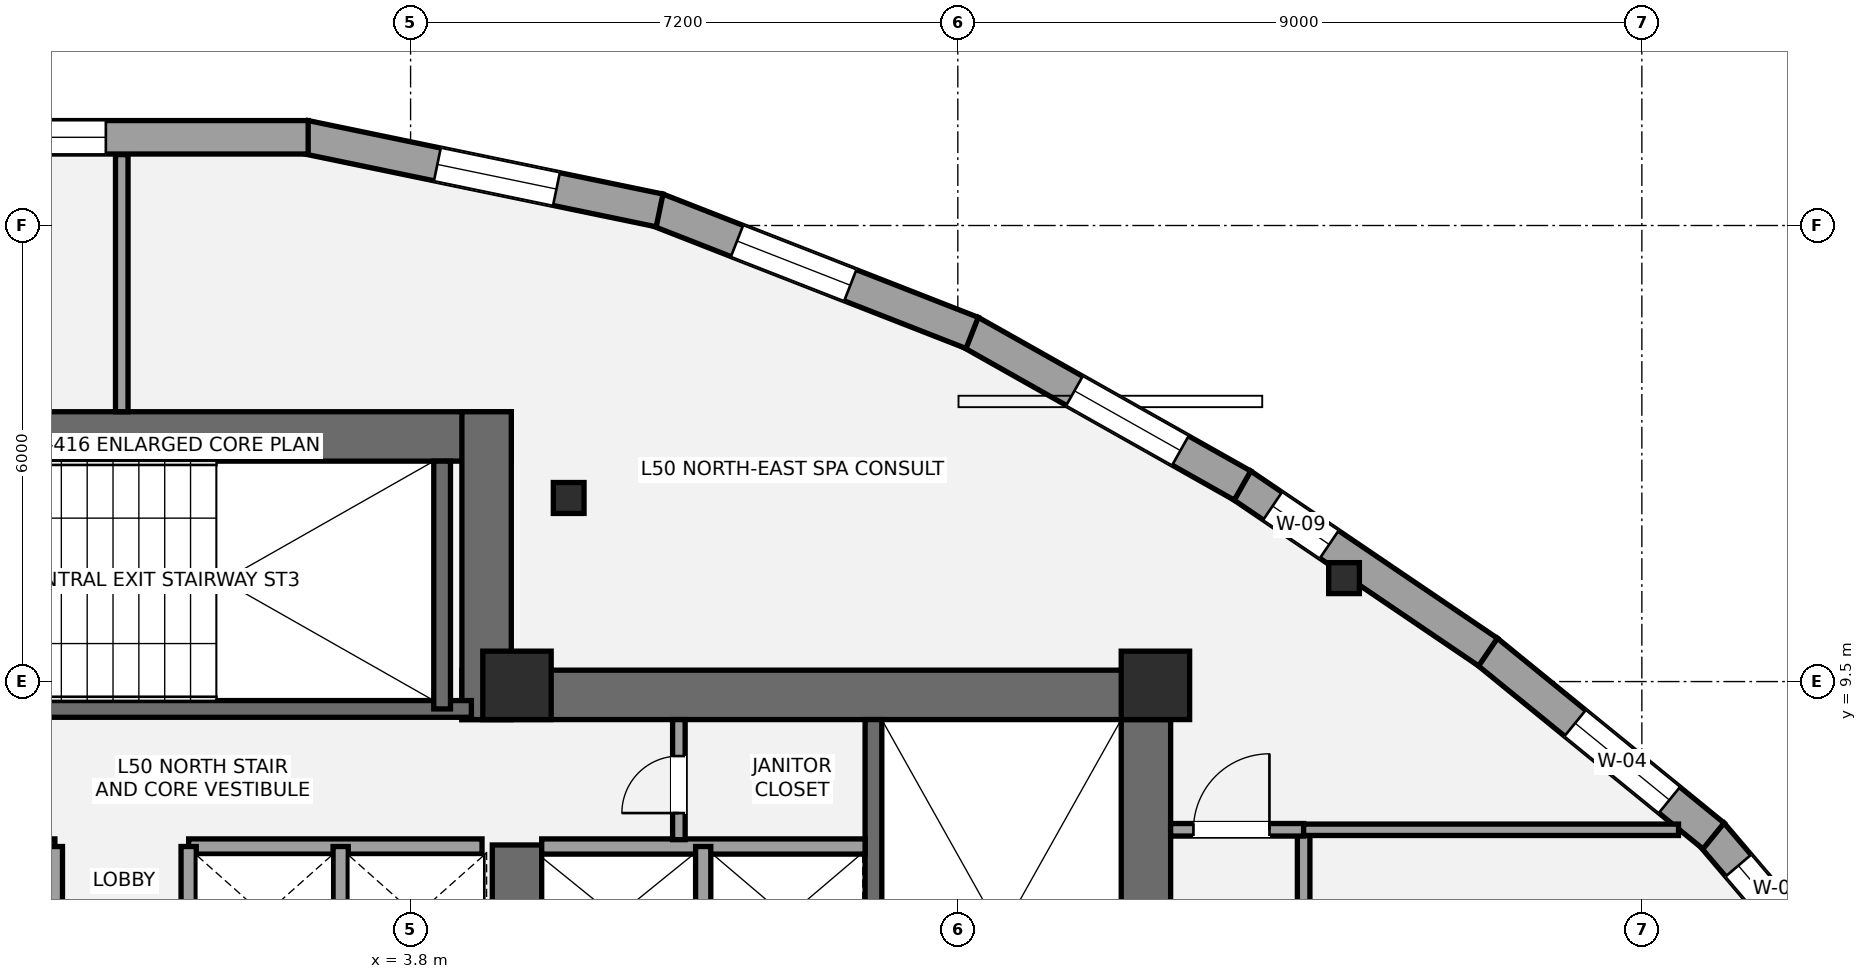
"""IFC4 building model, lengths in metres.
Left out: names, types, materials, properties, quantities, classifications, styles, units other than length and angle.
Written with IfcOpenShell. Run it as: python <this file> out.ifc"""

import sys

from ifc_helpers import new_model, si_unit, direction, frame, frame_2d, origin, origin_2d, place, context, subcontext, project, spatial, rectangle, i_section, extrude, element, fill, save


model = new_model("IFC4")
c1 = context("Model", 3, precision=1e-05, world=origin(), true_north=direction((0.0, 1.0)))
c2 = subcontext(c1, "Body", "Model", "MODEL_VIEW")
j1 = project(units=[si_unit("LENGTHUNIT", "METRE"), si_unit("PLANEANGLEUNIT", "RADIAN")], contexts=[c1])
p1 = place(None, origin())
s1 = spatial("IfcSite", under=j1, at=p1, CompositionType="ELEMENT")
p2 = place(p1, origin())
s2 = spatial("IfcBuilding", under=s1, at=p2, CompositionType="ELEMENT")
p3 = place(p2, frame((0.0, 0.0, 182.2)))
s3 = spatial("IfcBuildingStorey", under=s2, at=p3, CompositionType="ELEMENT", Elevation=182.2)
p4 = place(p3, frame((13.475, 1.2, 0.0), z_axis=(0.0, 0.0, 1.0), x_axis=(0.0, 1.0, 0.0)))
e1 = element("IfcWall", 1, at=p4, inside=s3, PredefinedType="SHEAR", context=c2, shape_type="SweptSolid", body=[
    extrude(rectangle(XDim=8.45, YDim=0.65, at=frame_2d((4.225, 0.0))), origin(), (0.0, 0.0, 1.0), 3.2),
])
p5 = place(p3, frame((4.475, 9.325, 0.0), z_axis=(0.0, 0.0, 1.0), x_axis=(1.0, 0.0, 0.0)))
e2 = element("IfcWall", 2, at=p5, inside=s3, PredefinedType="SHEAR", context=c2, shape_type="SweptSolid", body=[
    extrude(rectangle(XDim=9.325, YDim=0.65, at=frame_2d((4.663, 0.0))), origin(), (0.0, 0.0, 1.0), 3.2),
])
p6 = place(p3, frame((5.2, 5.35, 0.0), z_axis=(0.0, 0.0, 1.0), x_axis=(0.0, 1.0, 0.0)))
e3 = element("IfcWall", 3, at=p6, inside=s3, PredefinedType="SHEAR", context=c2, shape_type="SweptSolid", body=[
    extrude(rectangle(XDim=2.0, YDim=0.65, at=frame_2d((1.0, 0.0))), origin(), (0.0, 0.0, 1.0), 3.2),
])
p7 = place(p3, frame((9.89, 1.85, 0.0), z_axis=(0.0, 0.0, 1.0), x_axis=(0.0, 1.0, 0.0)))
e4 = element("IfcWall", 4, at=p7, inside=s3, PredefinedType="SHEAR", context=c2, shape_type="SweptSolid", body=[
    extrude(rectangle(XDim=7.15, YDim=0.22, at=frame_2d((3.575, 0.0))), origin(), (0.0, 0.0, 1.0), 3.2),
])
p8 = place(p3, frame((-5.125, 12.725, 0.0), z_axis=(0.0, 0.0, 1.0), x_axis=(1.0, 0.0, 0.0)))
e5 = element("IfcWall", 5, at=p8, inside=s3, PredefinedType="SHEAR", context=c2, shape_type="SweptSolid", body=[
    extrude(rectangle(XDim=10.25, YDim=0.65, at=frame_2d((5.125, 0.0))), origin(), (0.0, 0.0, 1.0), 3.2),
])
p9 = place(p3, frame((4.8, 9.0, 0.0), z_axis=(0.0, 0.0, 1.0), x_axis=(0.0, 1.0, 0.0)))
e6 = element("IfcWall", 6, at=p9, inside=s3, PredefinedType="SHEAR", context=c2, shape_type="SweptSolid", body=[
    extrude(rectangle(XDim=4.05, YDim=0.65, at=frame_2d((2.025, 0.0))), origin(), (0.0, 0.0, 1.0), 3.2),
])
p10 = place(p3, frame((-4.7, 9.14, 0.0), z_axis=(0.0, 0.0, 1.0), x_axis=(1.0, 0.0, 0.0)))
e7 = element("IfcWall", 7, at=p10, inside=s3, PredefinedType="SHEAR", context=c2, shape_type="SweptSolid", body=[
    extrude(rectangle(XDim=9.3, YDim=0.22, at=frame_2d((4.65, 0.0))), origin(), (0.0, 0.0, 1.0), 3.2),
])
p11 = place(p10, frame((1.15, 0.0, 0.0)))
e8 = element("IfcOpeningElement", 8, at=p11, cuts=e7, PredefinedType="OPENING", context=c2, shape_type="SweptSolid", body=[
    extrude(rectangle(XDim=1.05, YDim=2.15, at=frame_2d((0.525, 1.075))), frame((0.0, 0.12, 0.0), z_axis=(0.0, -1.0, 0.0), x_axis=(1.0, 0.0, 0.0)), (0.0, 0.0, 1.0), 0.24),
])
p12 = place(p3, frame((4.215, 9.14, 0.0), z_axis=(0.0, 0.0, 1.0), x_axis=(0.0, 1.0, 0.0)))
e9 = element("IfcWall", 9, at=p12, inside=s3, PredefinedType="SHEAR", context=c2, shape_type="SweptSolid", body=[
    extrude(rectangle(XDim=3.26, YDim=0.22, at=frame_2d((1.63, 0.0))), origin(), (0.0, 0.0, 1.0), 3.2),
])
for number, where, z_axis, x_axis in (
    (10, (5.2, 9.45, 0.0), (0.0, 0.0, 1.0), (1.0, 0.0, 0.0)),
    (11, (13.6, 9.45, 0.0), (0.0, 0.0, 1.0), (1.0, 0.0, 0.0)),
):
    element("IfcColumn", number, at=place(p3, frame(where, z_axis=z_axis, x_axis=x_axis)), inside=s3, PredefinedType="COLUMN", context=c2, shape_type="SweptSolid", body=[
        extrude(rectangle(XDim=0.9, YDim=0.9, at=origin_2d()), origin(), (0.0, 0.0, 1.0), 3.2),
    ])
for number, where, z_axis, x_axis in (
    (12, (16.082, 10.861, 0.0), (0.0, 0.0, 1.0), (1.0, 0.0, 0.0)),
    (13, (5.88, 11.915, 0.0), (0.0, 0.0, 1.0), (1.0, 0.0, 0.0)),
):
    element("IfcColumn", number, at=place(p3, frame(where, z_axis=z_axis, x_axis=x_axis)), inside=s3, PredefinedType="COLUMN", context=c2, shape_type="SweptSolid", body=[
        extrude(i_section(OverallWidth=0.404, OverallDepth=0.407, WebThickness=0.027, FlangeThickness=0.044, at=origin_2d()), origin(), (0.0, 0.0, 1.0), 3.2),
    ])
p13 = place(p3, frame((20.914, 7.497, 0.0), z_axis=(0.0, 0.0, 1.0), x_axis=(0.648014991522, -0.761627580096, 0.0)))
e14 = element("IfcWall", 14, at=p13, inside=s3, PredefinedType="STANDARD", context=c2, shape_type="SweptSolid", body=[
    extrude(rectangle(XDim=3.692, YDim=0.44, at=frame_2d((1.846, 0.0))), origin(), (0.0, 0.0, 1.0), 2.315),
])
p14 = place(p13, frame((0.548, 0.0, 0.58)))
e15 = element("IfcOpeningElement", 15, at=p14, cuts=e14, PredefinedType="OPENING", context=c2, shape_type="SweptSolid", body=[
    extrude(rectangle(XDim=1.6, YDim=1.55, at=frame_2d((0.8, 0.775))), frame((0.0, 0.23, 0.0), z_axis=(0.0, -1.0, 0.0), x_axis=(1.0, 0.0, 0.0)), (0.0, 0.0, 1.0), 0.46),
])
p15 = place(p3, frame((17.96, 9.899, 0.0), z_axis=(0.0, 0.0, 1.0), x_axis=(0.77522232587, -0.631688487684, 0.0)))
e16 = element("IfcWall", 16, at=p15, inside=s3, PredefinedType="STANDARD", context=c2, shape_type="SweptSolid", body=[
    extrude(rectangle(XDim=3.847, YDim=0.44, at=frame_2d((1.924, 0.0))), origin(), (0.0, 0.0, 1.0), 2.315),
])
p16 = place(p15, frame((1.498, 0.0, 0.58)))
e17 = element("IfcOpeningElement", 17, at=p16, cuts=e16, PredefinedType="OPENING", context=c2, shape_type="SweptSolid", body=[
    extrude(rectangle(XDim=1.6, YDim=1.55, at=frame_2d((0.8, 0.775))), frame((0.0, 0.23, 0.0), z_axis=(0.0, -1.0, 0.0), x_axis=(1.0, 0.0, 0.0)), (0.0, 0.0, 1.0), 0.46),
])
p17 = place(p3, frame((14.73, 12.088, 0.0), z_axis=(0.0, 0.0, 1.0), x_axis=(0.827733986143, -0.561120707321, 0.0)))
e18 = element("IfcWall", 18, at=p17, inside=s3, PredefinedType="STANDARD", context=c2, shape_type="SweptSolid", body=[
    extrude(rectangle(XDim=3.921, YDim=0.44, at=frame_2d((1.96, 0.0))), origin(), (0.0, 0.0, 1.0), 2.315),
])
p18 = place(p17, frame((0.497, 0.0, 0.58)))
e19 = element("IfcOpeningElement", 19, at=p18, cuts=e18, PredefinedType="OPENING", context=c2, shape_type="SweptSolid", body=[
    extrude(rectangle(XDim=0.9, YDim=1.35, at=frame_2d((0.45, 0.675))), frame((0.0, 0.23, 0.0), z_axis=(0.0, -1.0, 0.0), x_axis=(1.0, 0.0, 0.0)), (0.0, 0.0, 1.0), 0.46),
])
p19 = place(p3, frame((11.16, 14.1, 0.0), z_axis=(0.0, 0.0, 1.0), x_axis=(0.871039635509, -0.491212737388, 0.0)))
e20 = element("IfcWall", 20, at=p19, inside=s3, PredefinedType="STANDARD", context=c2, shape_type="SweptSolid", body=[
    extrude(rectangle(XDim=4.116, YDim=0.44, at=frame_2d((2.058, 0.0))), origin(), (0.0, 0.0, 1.0), 2.315),
])
p20 = place(p19, frame((1.578, 0.0, 0.58)))
e21 = element("IfcOpeningElement", 21, at=p20, cuts=e20, PredefinedType="OPENING", context=c2, shape_type="SweptSolid", body=[
    extrude(rectangle(XDim=1.6, YDim=1.55, at=frame_2d((0.8, 0.775))), frame((0.0, 0.23, 0.0), z_axis=(0.0, -1.0, 0.0), x_axis=(1.0, 0.0, 0.0)), (0.0, 0.0, 1.0), 0.46),
])
p21 = place(p3, frame((7.041, 15.709, 0.0), z_axis=(0.0, 0.0, 1.0), x_axis=(0.93133333838, -0.364167836062, 0.0)))
e22 = element("IfcWall", 22, at=p21, inside=s3, PredefinedType="STANDARD", context=c2, shape_type="SweptSolid", body=[
    extrude(rectangle(XDim=4.454, YDim=0.44, at=frame_2d((2.227, 0.0))), origin(), (0.0, 0.0, 1.0), 2.315),
])
p22 = place(p21, frame((1.132, 0.0, 0.58)))
e23 = element("IfcOpeningElement", 23, at=p22, cuts=e22, PredefinedType="OPENING", context=c2, shape_type="SweptSolid", body=[
    extrude(rectangle(XDim=1.6, YDim=1.55, at=frame_2d((0.8, 0.775))), frame((0.0, 0.23, 0.0), z_axis=(0.0, -1.0, 0.0), x_axis=(1.0, 0.0, 0.0)), (0.0, 0.0, 1.0), 0.46),
])
p23 = place(p3, frame((2.408, 16.665, 0.0), z_axis=(0.0, 0.0, 1.0), x_axis=(0.979222564836, -0.202788482206, 0.0)))
e24 = element("IfcWall", 24, at=p23, inside=s3, PredefinedType="STANDARD", context=c2, shape_type="SweptSolid", body=[
    extrude(rectangle(XDim=4.768, YDim=0.44, at=frame_2d((2.384, 0.0))), origin(), (0.0, 0.0, 1.0), 2.315),
])
p24 = place(p23, frame((1.781, 0.0, 0.58)))
e25 = element("IfcOpeningElement", 25, at=p24, cuts=e24, PredefinedType="OPENING", context=c2, shape_type="SweptSolid", body=[
    extrude(rectangle(XDim=1.6, YDim=1.55, at=frame_2d((0.8, 0.775))), frame((0.0, 0.23, 0.0), z_axis=(0.0, -1.0, 0.0), x_axis=(1.0, 0.0, 0.0)), (0.0, 0.0, 1.0), 0.46),
])
p25 = place(p3, frame((-2.452, 16.66, 0.0), z_axis=(0.0, 0.0, 1.0), x_axis=(1.0, 0.0, 0.0)))
e26 = element("IfcWall", 26, at=p25, inside=s3, PredefinedType="STANDARD", context=c2, shape_type="SweptSolid", body=[
    extrude(rectangle(XDim=4.905, YDim=0.44, at=frame_2d((2.452, 0.0))), origin(), (0.0, 0.0, 1.0), 2.315),
])
p26 = place(p25, frame((0.643, 0.0, 0.58)))
e27 = element("IfcOpeningElement", 27, at=p26, cuts=e26, PredefinedType="OPENING", context=c2, shape_type="SweptSolid", body=[
    extrude(rectangle(XDim=1.6, YDim=1.55, at=frame_2d((0.8, 0.775))), frame((0.0, 0.23, 0.0), z_axis=(0.0, -1.0, 0.0), x_axis=(1.0, 0.0, 0.0)), (0.0, 0.0, 1.0), 0.46),
])
p27 = place(p3, frame((5.525, 7.33, 0.0), z_axis=(0.0, 0.0, 1.0), x_axis=(1.0, 0.0, 0.0)))
e28 = element("IfcWall", 28, at=p27, inside=s3, PredefinedType="SOLIDWALL", context=c2, shape_type="SweptSolid", body=[
    extrude(rectangle(XDim=4.255, YDim=0.2, at=frame_2d((2.127, 0.0))), origin(), (0.0, 0.0, 1.0), 3.02),
])
p28 = place(p3, frame((7.65, 5.47, 0.0), z_axis=(0.0, 0.0, 1.0), x_axis=(0.0, 1.0, 0.0)))
e29 = element("IfcWall", 29, at=p28, inside=s3, PredefinedType="SOLIDWALL", context=c2, shape_type="SweptSolid", body=[
    extrude(rectangle(XDim=1.86, YDim=0.2, at=frame_2d((0.93, 0.0))), origin(), (0.0, 0.0, 1.0), 3.02),
])
for number, where, z_axis, x_axis in (
    (30, (-4.74, 7.33, 0.0), (0.0, 0.0, 1.0), (1.0, 0.0, 0.0)),
    (31, (0.88, 7.33, 0.0), (0.0, 0.0, 1.0), (1.0, 0.0, 0.0)),
):
    element("IfcWall", number, at=place(p3, frame(where, z_axis=z_axis, x_axis=x_axis)), inside=s3, PredefinedType="SOLIDWALL", context=c2, shape_type="SweptSolid", body=[
        extrude(rectangle(XDim=3.86, YDim=0.2, at=frame_2d((1.93, 0.0))), origin(), (0.0, 0.0, 1.0), 3.02),
    ])
for number, where, z_axis, x_axis in (
    (32, (2.88, 5.52, 0.0), (0.0, 0.0, 1.0), (0.0, 1.0, 0.0)),
    (33, (-0.88, 5.52, 0.0), (0.0, 0.0, 1.0), (0.0, 1.0, 0.0)),
    (34, (0.88, 5.52, 0.0), (0.0, 0.0, 1.0), (0.0, 1.0, 0.0)),
):
    element("IfcWall", number, at=place(p3, frame(where, z_axis=z_axis, x_axis=x_axis)), inside=s3, PredefinedType="SOLIDWALL", context=c2, shape_type="SweptSolid", body=[
        extrude(rectangle(XDim=1.81, YDim=0.2, at=frame_2d((0.905, 0.0))), origin(), (0.0, 0.0, 1.0), 3.02),
    ])
p29 = place(p3, frame((7.33, 7.42, 0.0), z_axis=(0.0, 0.0, 1.0), x_axis=(0.0, 1.0, 0.0)))
e35 = element("IfcWall", 35, at=p29, inside=s3, PredefinedType="PARTITIONING", context=c2, shape_type="SweptSolid", body=[
    extrude(rectangle(XDim=1.58, YDim=0.165, at=frame_2d((0.79, 0.0))), origin(), (0.0, 0.0, 1.0), 3.02),
])
p30 = place(p29, frame((0.35, 0.0, 0.0)))
e36 = element("IfcOpeningElement", 36, at=p30, cuts=e35, PredefinedType="OPENING", context=c2, shape_type="SweptSolid", body=[
    extrude(rectangle(XDim=0.75, YDim=2.1, at=frame_2d((0.375, 1.05))), frame((0.0, 0.093, 0.0), z_axis=(0.0, -1.0, 0.0), x_axis=(1.0, 0.0, 0.0)), (0.0, 0.0, 1.0), 0.185),
])
p31 = place(p3, frame((15.55, -11.257, 0.0), z_axis=(0.0, 0.0, 1.0), x_axis=(0.0, 1.0, 0.0)))
e37 = element("IfcWall", 37, at=p31, inside=s3, PredefinedType="PARTITIONING", context=c2, shape_type="SweptSolid", body=[
    extrude(rectangle(XDim=18.807, YDim=0.165, at=frame_2d((9.403, 0.0))), origin(), (0.0, 0.0, 1.0), 2.473),
])
p32 = place(p31, frame((4.106, 0.0, 0.0)))
e38 = element("IfcOpeningElement", 38, at=p32, cuts=e37, PredefinedType="OPENING", context=c2, shape_type="SweptSolid", body=[
    extrude(rectangle(XDim=0.85, YDim=2.1, at=frame_2d((0.425, 1.05))), frame((0.0, 0.093, 0.0), z_axis=(0.0, -1.0, 0.0), x_axis=(1.0, 0.0, 0.0)), (0.0, 0.0, 1.0), 0.185),
])
p33 = place(p31, frame((7.257, 0.0, 0.0)))
e39 = element("IfcOpeningElement", 39, at=p33, cuts=e37, PredefinedType="OPENING", context=c2, shape_type="SweptSolid", body=[
    extrude(rectangle(XDim=1.0, YDim=2.15, at=frame_2d((0.5, 1.075))), frame((0.0, 0.093, 0.0), z_axis=(0.0, -1.0, 0.0), x_axis=(1.0, 0.0, 0.0)), (0.0, 0.0, 1.0), 0.185),
])
p34 = place(p31, frame((11.656, 0.0, 0.0)))
e40 = element("IfcOpeningElement", 40, at=p34, cuts=e37, PredefinedType="OPENING", context=c2, shape_type="SweptSolid", body=[
    extrude(rectangle(XDim=1.0, YDim=2.15, at=frame_2d((0.5, 1.075))), frame((0.0, 0.093, 0.0), z_axis=(0.0, -1.0, 0.0), x_axis=(1.0, 0.0, 0.0)), (0.0, 0.0, 1.0), 0.185),
])
p35 = place(p31, frame((16.031, 0.0, 0.0)))
e41 = element("IfcOpeningElement", 41, at=p35, cuts=e37, PredefinedType="OPENING", context=c2, shape_type="SweptSolid", body=[
    extrude(rectangle(XDim=1.0, YDim=2.15, at=frame_2d((0.5, 1.075))), frame((0.0, 0.093, 0.0), z_axis=(0.0, -1.0, 0.0), x_axis=(1.0, 0.0, 0.0)), (0.0, 0.0, 1.0), 0.185),
])
p36 = place(p3, frame((13.8, 7.55, 0.0), z_axis=(0.0, 0.0, 1.0), x_axis=(1.0, 0.0, 0.0)))
e42 = element("IfcWall", 42, at=p36, inside=s3, PredefinedType="PARTITIONING", context=c2, shape_type="SweptSolid", body=[
    extrude(rectangle(XDim=1.75, YDim=0.165, at=frame_2d((0.875, 0.0))), origin(), (0.0, 0.0, 1.0), 3.02),
])
p37 = place(p36, frame((0.3, 0.0, 0.0)))
e43 = element("IfcOpeningElement", 43, at=p37, cuts=e42, PredefinedType="OPENING", context=c2, shape_type="SweptSolid", body=[
    extrude(rectangle(XDim=1.0, YDim=2.15, at=frame_2d((0.5, 1.075))), frame((0.0, 0.093, 0.0), z_axis=(0.0, -1.0, 0.0), x_axis=(1.0, 0.0, 0.0)), (0.0, 0.0, 1.0), 0.185),
])
p38 = place(p3, frame((15.55, 7.55, 0.0), z_axis=(0.0, 0.0, 1.0), x_axis=(1.0, 0.0, 0.0)))
e44 = element("IfcWall", 44, at=p38, inside=s3, PredefinedType="PLUMBINGWALL", context=c2, shape_type="SweptSolid", body=[
    extrude(rectangle(XDim=4.932, YDim=0.15, at=frame_2d((2.466, 0.0))), origin(), (0.0, 0.0, 1.0), 2.473),
])
p39 = place(p3, frame((0.0, 13.05, 0.0), z_axis=(0.0, 0.0, 1.0), x_axis=(0.0, 1.0, 0.0)))
e45 = element("IfcWall", 45, at=p39, inside=s3, PredefinedType="PARTITIONING", context=c2, shape_type="SweptSolid", body=[
    extrude(rectangle(XDim=3.383, YDim=0.165, at=frame_2d((1.691, 0.0))), origin(), (0.0, 0.0, 1.0), 3.02),
])
p40 = place(p14, origin())
e46 = element("IfcWindow", 46, at=p40, inside=s3, PartitioningType="SINGLE_PANEL", PredefinedType="WINDOW", context=c2, shape_type="SweptSolid", body=[
    extrude(rectangle(XDim=1.6, YDim=1.55, at=frame_2d((0.8, 0.775))), frame((0.0, -0.01, 0.0), z_axis=(0.0, -1.0, 0.0), x_axis=(1.0, 0.0, 0.0)), (0.0, 0.0, 1.0), 0.06),
])
fill(e15, e46)
p41 = place(p16, origin())
e47 = element("IfcWindow", 47, at=p41, inside=s3, PartitioningType="SINGLE_PANEL", PredefinedType="WINDOW", context=c2, shape_type="SweptSolid", body=[
    extrude(rectangle(XDim=1.6, YDim=1.55, at=frame_2d((0.8, 0.775))), frame((0.0, -0.01, 0.0), z_axis=(0.0, -1.0, 0.0), x_axis=(1.0, 0.0, 0.0)), (0.0, 0.0, 1.0), 0.06),
])
fill(e17, e47)
p42 = place(p18, origin())
e48 = element("IfcWindow", 48, at=p42, inside=s3, PartitioningType="SINGLE_PANEL", PredefinedType="WINDOW", context=c2, shape_type="SweptSolid", body=[
    extrude(rectangle(XDim=0.9, YDim=1.35, at=frame_2d((0.45, 0.675))), frame((0.0, -0.01, 0.0), z_axis=(0.0, -1.0, 0.0), x_axis=(1.0, 0.0, 0.0)), (0.0, 0.0, 1.0), 0.06),
])
fill(e19, e48)
p43 = place(p20, origin())
e49 = element("IfcWindow", 49, at=p43, inside=s3, PartitioningType="SINGLE_PANEL", PredefinedType="WINDOW", context=c2, shape_type="SweptSolid", body=[
    extrude(rectangle(XDim=1.6, YDim=1.55, at=frame_2d((0.8, 0.775))), frame((0.0, -0.01, 0.0), z_axis=(0.0, -1.0, 0.0), x_axis=(1.0, 0.0, 0.0)), (0.0, 0.0, 1.0), 0.06),
])
fill(e21, e49)
p44 = place(p22, origin())
e50 = element("IfcWindow", 50, at=p44, inside=s3, PartitioningType="SINGLE_PANEL", PredefinedType="WINDOW", context=c2, shape_type="SweptSolid", body=[
    extrude(rectangle(XDim=1.6, YDim=1.55, at=frame_2d((0.8, 0.775))), frame((0.0, -0.01, 0.0), z_axis=(0.0, -1.0, 0.0), x_axis=(1.0, 0.0, 0.0)), (0.0, 0.0, 1.0), 0.06),
])
fill(e23, e50)
p45 = place(p24, origin())
e51 = element("IfcWindow", 51, at=p45, inside=s3, PartitioningType="SINGLE_PANEL", PredefinedType="WINDOW", context=c2, shape_type="SweptSolid", body=[
    extrude(rectangle(XDim=1.6, YDim=1.55, at=frame_2d((0.8, 0.775))), frame((0.0, -0.01, 0.0), z_axis=(0.0, -1.0, 0.0), x_axis=(1.0, 0.0, 0.0)), (0.0, 0.0, 1.0), 0.06),
])
fill(e25, e51)
p46 = place(p26, origin())
e52 = element("IfcWindow", 52, at=p46, inside=s3, PartitioningType="SINGLE_PANEL", PredefinedType="WINDOW", context=c2, shape_type="SweptSolid", body=[
    extrude(rectangle(XDim=1.6, YDim=1.55, at=frame_2d((0.8, 0.775))), frame((0.0, -0.01, 0.0), z_axis=(0.0, -1.0, 0.0), x_axis=(1.0, 0.0, 0.0)), (0.0, 0.0, 1.0), 0.06),
])
fill(e27, e52)
p47 = place(p30, origin())
e53 = element("IfcDoor", 53, at=p47, inside=s3, OperationType="SINGLE_SWING_LEFT", PredefinedType="DOOR", context=c2, shape_type="SweptSolid", body=[
    extrude(rectangle(XDim=0.75, YDim=2.1, at=frame_2d((0.375, 1.05))), frame((0.0, 0.025, 0.0), z_axis=(0.0, -1.0, 0.0), x_axis=(1.0, 0.0, 0.0)), (0.0, 0.0, 1.0), 0.05),
])
fill(e36, e53)
p48 = place(p37, origin())
e54 = element("IfcDoor", 54, at=p48, inside=s3, OperationType="SINGLE_SWING_RIGHT", PredefinedType="DOOR", context=c2, shape_type="SweptSolid", body=[
    extrude(rectangle(XDim=1.0, YDim=2.15, at=frame_2d((0.5, 1.075))), frame((0.0, 0.025, 0.0), z_axis=(0.0, -1.0, 0.0), x_axis=(1.0, 0.0, 0.0)), (0.0, 0.0, 1.0), 0.05),
])
fill(e43, e54)
save(model, sys.argv[1])
